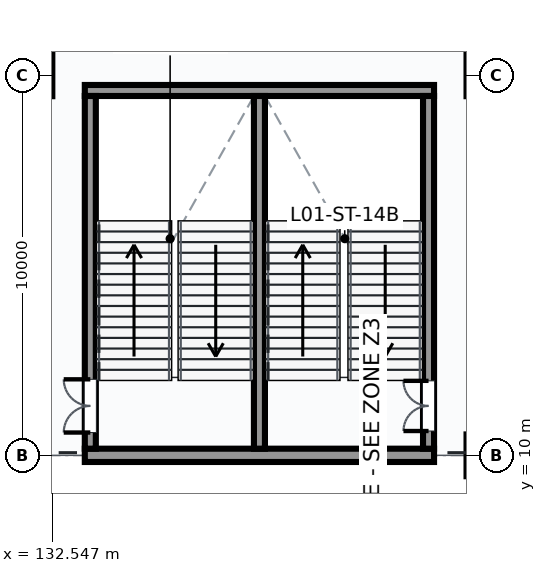
"""IFC4 building model, lengths in metres.
Left out: names, types, materials, properties, quantities, classifications, styles, units other than length and angle.
Written with IfcOpenShell. Run it as: python <this file> out.ifc"""

import sys

from ifc_helpers import new_model, si_unit, direction, frame, frame_2d, origin, place, context, subcontext, project, spatial, rectangle, extrude, element, fill, save


model = new_model("IFC4")
c1 = context("Model", 3, precision=1e-05, world=origin(), true_north=direction((0.0, 1.0)))
c2 = subcontext(c1, "Body", "Model", "MODEL_VIEW")
j1 = project(units=[si_unit("LENGTHUNIT", "METRE"), si_unit("PLANEANGLEUNIT", "RADIAN")], contexts=[c1])
p1 = place(None, origin())
s1 = spatial("IfcSite", under=j1, at=p1, CompositionType="ELEMENT")
p2 = place(p1, origin())
s2 = spatial("IfcBuilding", under=s1, at=p2, CompositionType="ELEMENT")
p3 = place(p2, frame((0.0, 0.0, 5.4)))
s3 = spatial("IfcBuildingStorey", under=s2, at=p3, CompositionType="ELEMENT", Elevation=5.4)
p4 = place(p3, frame((133.405, 10.0, 0.0), z_axis=(0.0, 0.0, 1.0), x_axis=(1.0, 0.0, 0.0)))
e1 = element("IfcWall", 1, at=p4, inside=s3, PredefinedType="SHEAR", context=c2, shape_type="SweptSolid", body=[
    extrude(rectangle(XDim=9.19, YDim=0.35, at=frame_2d((4.595, 0.0))), origin(), (0.0, 0.0, 1.0), 3.757),
])
p5 = place(p3, frame((133.405, 19.6, 0.0), z_axis=(0.0, 0.0, 1.0), x_axis=(1.0, 0.0, 0.0)))
e2 = element("IfcWall", 2, at=p5, inside=s3, PredefinedType="SHEAR", context=c2, shape_type="SweptSolid", body=[
    extrude(rectangle(XDim=9.19, YDim=0.29, at=frame_2d((4.595, 0.0))), origin(), (0.0, 0.0, 1.0), 4.8),
])
p6 = place(p3, frame((133.55, 10.175, 0.0), z_axis=(0.0, 0.0, 1.0), x_axis=(0.0, 1.0, 0.0)))
e3 = element("IfcWall", 3, at=p6, inside=s3, PredefinedType="SHEAR", context=c2, shape_type="SweptSolid", body=[
    extrude(rectangle(XDim=9.28, YDim=0.29, at=frame_2d((4.64, 0.0))), origin(), (0.0, 0.0, 1.0), 4.8),
])
p7 = place(p6, frame((0.425, 0.0, 0.0)))
e4 = element("IfcOpeningElement", 4, at=p7, cuts=e3, PredefinedType="OPENING", context=c2, shape_type="SweptSolid", body=[
    extrude(rectangle(XDim=1.4, YDim=2.2, at=frame_2d((0.7, 1.1))), frame((0.0, 0.155, 0.0), z_axis=(0.0, -1.0, 0.0), x_axis=(1.0, 0.0, 0.0)), (0.0, 0.0, 1.0), 0.31),
])
p8 = place(p3, frame((142.45, 10.175, 0.0), z_axis=(0.0, 0.0, 1.0), x_axis=(0.0, 1.0, 0.0)))
e5 = element("IfcWall", 5, at=p8, inside=s3, PredefinedType="SHEAR", context=c2, shape_type="SweptSolid", body=[
    extrude(rectangle(XDim=9.28, YDim=0.29, at=frame_2d((4.64, 0.0))), origin(), (0.0, 0.0, 1.0), 4.8),
])
p9 = place(p8, frame((0.465, 0.0, 0.0)))
e6 = element("IfcOpeningElement", 6, at=p9, cuts=e5, PredefinedType="OPENING", context=c2, shape_type="SweptSolid", body=[
    extrude(rectangle(XDim=1.32, YDim=2.2, at=frame_2d((0.66, 1.1))), frame((0.0, 0.155, 0.0), z_axis=(0.0, -1.0, 0.0), x_axis=(1.0, 0.0, 0.0)), (0.0, 0.0, 1.0), 0.31),
])
p10 = place(p3, frame((138.0, 10.175, 0.0), z_axis=(0.0, 0.0, 1.0), x_axis=(0.0, 1.0, 0.0)))
e7 = element("IfcWall", 7, at=p10, inside=s3, PredefinedType="SHEAR", context=c2, shape_type="SweptSolid", body=[
    extrude(rectangle(XDim=9.28, YDim=0.29, at=frame_2d((4.64, 0.0))), origin(), (0.0, 0.0, 1.0), 4.8),
])
p11 = place(p7, frame((1.4, 0.0, 0.0), z_axis=(0.0, 0.0, 1.0), x_axis=(-1.0, 0.0, 0.0)))
e8 = element("IfcDoor", 8, at=p11, inside=s3, OperationType="DOUBLE_DOOR_SINGLE_SWING", PredefinedType="DOOR", context=c2, shape_type="SweptSolid", body=[
    extrude(rectangle(XDim=1.4, YDim=2.2, at=frame_2d((0.7, 1.1))), frame((0.0, 0.025, 0.0), z_axis=(0.0, -1.0, 0.0), x_axis=(1.0, 0.0, 0.0)), (0.0, 0.0, 1.0), 0.05),
])
fill(e4, e8)
p12 = place(p9, origin())
e9 = element("IfcDoor", 9, at=p12, inside=s3, OperationType="DOUBLE_DOOR_SINGLE_SWING", PredefinedType="DOOR", context=c2, shape_type="SweptSolid", body=[
    extrude(rectangle(XDim=1.32, YDim=2.2, at=frame_2d((0.66, 1.1))), frame((0.0, 0.025, 0.0), z_axis=(0.0, -1.0, 0.0), x_axis=(1.0, 0.0, 0.0)), (0.0, 0.0, 1.0), 0.05),
])
fill(e6, e9)
save(model, sys.argv[1])
